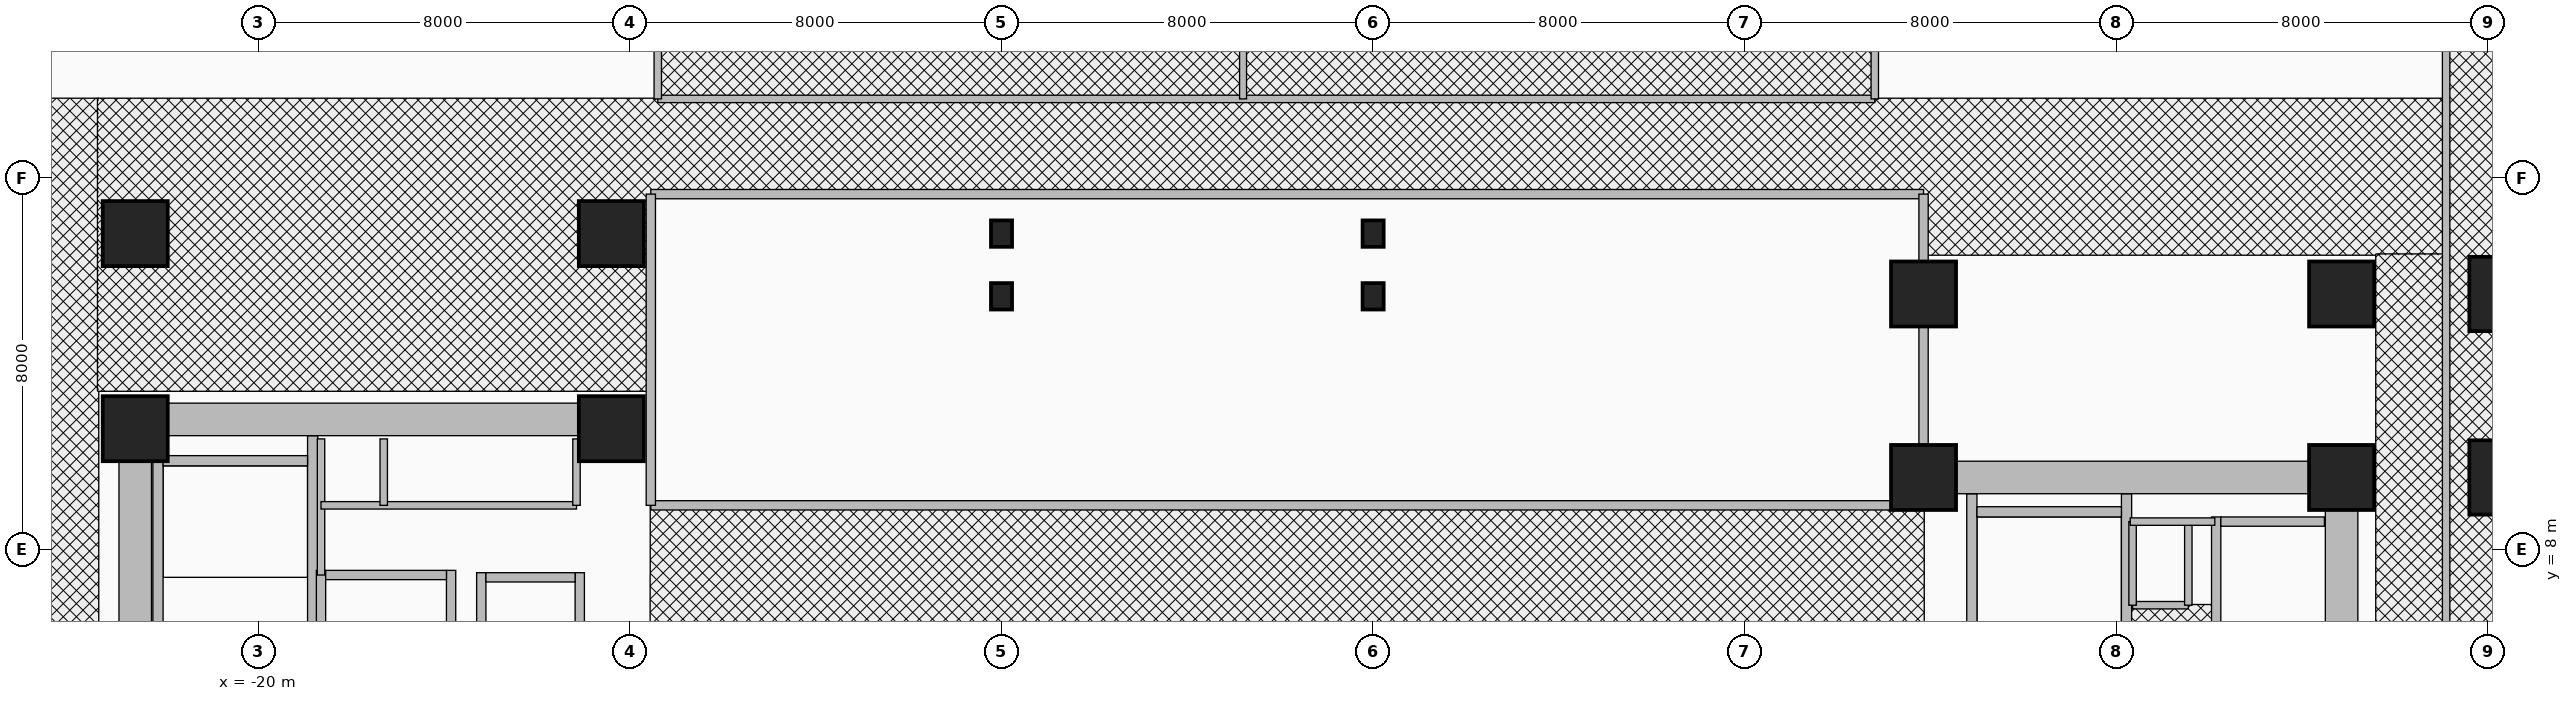
"""IFC4 building model, lengths in metres.
Left out: names, types, materials, properties, quantities, classifications, styles, units other than length and angle.
Written with IfcOpenShell. Run it as: python <this file> out.ifc"""

import sys

from ifc_helpers import new_model, si_unit, direction, frame, frame_2d, origin, origin_2d, place, context, subcontext, project, spatial, rectangle, i_section, extrude, source, transform, mapped, element, fill, save


model = new_model("IFC4")
c1 = context("Model", 3, precision=1e-05, world=origin(), true_north=direction((0.0, 1.0)))
c2 = subcontext(c1, "Body", "Model", "MODEL_VIEW")
j1 = project(units=[si_unit("LENGTHUNIT", "METRE"), si_unit("PLANEANGLEUNIT", "RADIAN")], contexts=[c1])
p1 = place(None, origin())
s1 = spatial("IfcSite", under=j1, at=p1, CompositionType="ELEMENT")
p2 = place(p1, origin())
s2 = spatial("IfcBuilding", under=s1, at=p2, CompositionType="ELEMENT")
p3 = place(p2, frame((0.0, 0.0, 20.8)))
s3 = spatial("IfcBuildingStorey", under=s2, at=p3, CompositionType="ELEMENT", Elevation=20.8)
for number, where, z_axis, x_axis in (
    (1, (-22.16, 1.78, 0.0), (0.0, 0.0, 1.0), (0.0, 1.0, 0.0)),
    (2, (-18.83, 1.78, 0.0), (0.0, 0.0, 1.0), (0.0, 1.0, 0.0)),
):
    element("IfcWall", number, at=place(p3, frame(where, z_axis=z_axis, x_axis=x_axis)), inside=s3, PredefinedType="SHEAR", context=c2, shape_type="SweptSolid", body=[
        extrude(rectangle(XDim=8.67, YDim=0.22, at=frame_2d((4.335, 0.0))), origin(), (0.0, 0.0, 1.0), 4.96),
    ])
p4 = place(p3, frame((-22.05, 9.91, 0.0), z_axis=(0.0, 0.0, 1.0), x_axis=(1.0, 0.0, 0.0)))
e3 = element("IfcWall", 3, at=p4, inside=s3, PredefinedType="SHEAR", context=c2, shape_type="SweptSolid", body=[
    extrude(rectangle(XDim=3.11, YDim=0.22, at=frame_2d((1.555, 0.0))), origin(), (0.0, 0.0, 1.0), 4.96),
])
for number, where, z_axis, x_axis in (
    (4, (16.89, 0.68, 0.0), (0.0, 0.0, 1.0), (0.0, 1.0, 0.0)),
    (5, (20.22, 0.68, 0.0), (0.0, 0.0, 1.0), (0.0, 1.0, 0.0)),
):
    element("IfcWall", number, at=place(p3, frame(where, z_axis=z_axis, x_axis=x_axis)), inside=s3, PredefinedType="SHEAR", context=c2, shape_type="SweptSolid", body=[
        extrude(rectangle(XDim=8.52, YDim=0.22, at=frame_2d((4.26, 0.0))), origin(), (0.0, 0.0, 1.0), 4.96),
    ])
p5 = place(p3, frame((17.0, 8.81, 0.0), z_axis=(0.0, 0.0, 1.0), x_axis=(1.0, 0.0, 0.0)))
e6 = element("IfcWall", 6, at=p5, inside=s3, PredefinedType="SHEAR", context=c2, shape_type="SweptSolid", body=[
    extrude(rectangle(XDim=3.11, YDim=0.22, at=frame_2d((1.555, 0.0))), origin(), (0.0, 0.0, 1.0), 4.96),
])
p6 = place(p3, frame((-22.65, -11.15, 0.0), z_axis=(0.0, 0.0, 1.0), x_axis=(0.0, 1.0, 0.0)))
e7 = element("IfcWall", 7, at=p6, inside=s3, PredefinedType="SHEAR", context=c2, shape_type="SweptSolid", body=[
    extrude(rectangle(XDim=22.3, YDim=0.7, at=frame_2d((11.15, 0.0))), origin(), (0.0, 0.0, 1.0), 4.96),
])
p7 = place(p3, frame((-22.65, 10.8, 0.0), z_axis=(0.0, 0.0, 1.0), x_axis=(1.0, 0.0, 0.0)))
e8 = element("IfcWall", 8, at=p7, inside=s3, PredefinedType="SHEAR", context=c2, shape_type="SweptSolid", body=[
    extrude(rectangle(XDim=10.25, YDim=0.7, at=frame_2d((5.125, 0.0))), origin(), (0.0, 0.0, 1.0), 4.96),
])
p8 = place(p3, frame((24.85, 0.95, 0.0), z_axis=(0.0, 0.0, 1.0), x_axis=(0.0, 1.0, 0.0)))
e9 = element("IfcWall", 9, at=p8, inside=s3, PredefinedType="SHEAR", context=c2, shape_type="SweptSolid", body=[
    extrude(rectangle(XDim=8.95, YDim=0.7, at=frame_2d((4.475, 0.0))), origin(), (0.0, 0.0, 1.0), 4.96),
])
p9 = place(p3, frame((15.85, 9.55, 0.0), z_axis=(0.0, 0.0, 1.0), x_axis=(1.0, 0.0, 0.0)))
e10 = element("IfcWall", 10, at=p9, inside=s3, PredefinedType="SHEAR", context=c2, shape_type="SweptSolid", body=[
    extrude(rectangle(XDim=9.0, YDim=0.7, at=frame_2d((4.5, 0.0))), origin(), (0.0, 0.0, 1.0), 4.96),
])
m1 = source(origin(), c2, "Body", "SweptSolid", [
    extrude(rectangle(XDim=1.4, YDim=1.4, at=origin_2d()), origin(), (0.0, 0.0, 1.0), 5.2),
])
for number, where, z_axis, x_axis in (
    (11, (-22.65, 10.6, 0.0), (0.0, 0.0, 1.0), (1.0, 0.0, 0.0)),
    (12, (-12.4, 10.6, 0.0), (0.0, 0.0, 1.0), (1.0, 0.0, 0.0)),
    (13, (-22.65, 14.8, 0.0), (0.0, 0.0, 1.0), (1.0, 0.0, 0.0)),
    (14, (-12.4, 14.8, 0.0), (0.0, 0.0, 1.0), (1.0, 0.0, 0.0)),
    (15, (15.85, 9.55, 0.0), (0.0, 0.0, 1.0), (1.0, 0.0, 0.0)),
    (16, (24.85, 9.55, 0.0), (0.0, 0.0, 1.0), (1.0, 0.0, 0.0)),
):
    element("IfcColumn", number, at=place(p3, frame(where, z_axis=z_axis, x_axis=x_axis)), inside=s3, PredefinedType="COLUMN", context=c2, shape_type="MappedRepresentation", body=[
        mapped(m1, transform((0.0, 0.0, 0.0), x_axis=(1.0, 0.0, 0.0), y_axis=(0.0, 1.0, 0.0), z_axis=(0.0, 0.0, 1.0), scale=1.0)),
    ])
m2 = source(origin(), c2, "Body", "SweptSolid", [
    extrude(rectangle(XDim=1.6, YDim=1.6, at=origin_2d()), origin(), (0.0, 0.0, 1.0), 5.2),
])
p10 = place(p3, frame((28.4, 9.55, 0.0), z_axis=(0.0, 0.0, 1.0), x_axis=(1.0, 0.0, 0.0)))
e17 = element("IfcColumn", 17, at=p10, inside=s3, PredefinedType="COLUMN", context=c2, shape_type="MappedRepresentation", body=[
    mapped(m2, transform((0.0, 0.0, 0.0), x_axis=(1.0, 0.0, 0.0), y_axis=(0.0, 1.0, 0.0), z_axis=(0.0, 0.0, 1.0), scale=1.0)),
])
for number, where, z_axis, x_axis in (
    (18, (15.85, 13.5, 0.0), (0.0, 0.0, 1.0), (1.0, 0.0, 0.0)),
    (19, (24.85, 13.5, 0.0), (0.0, 0.0, 1.0), (1.0, 0.0, 0.0)),
):
    element("IfcColumn", number, at=place(p3, frame(where, z_axis=z_axis, x_axis=x_axis)), inside=s3, PredefinedType="COLUMN", context=c2, shape_type="MappedRepresentation", body=[
        mapped(m1, transform((0.0, 0.0, 0.0), x_axis=(1.0, 0.0, 0.0), y_axis=(0.0, 1.0, 0.0), z_axis=(0.0, 0.0, 1.0), scale=1.0)),
    ])
p11 = place(p3, frame((28.4, 13.5, 0.0), z_axis=(0.0, 0.0, 1.0), x_axis=(1.0, 0.0, 0.0)))
e20 = element("IfcColumn", 20, at=p11, inside=s3, PredefinedType="COLUMN", context=c2, shape_type="MappedRepresentation", body=[
    mapped(m2, transform((0.0, 0.0, 0.0), x_axis=(1.0, 0.0, 0.0), y_axis=(0.0, 1.0, 0.0), z_axis=(0.0, 0.0, 1.0), scale=1.0)),
])
m3 = source(origin(), c2, "Body", "SweptSolid", [
    extrude(i_section(OverallWidth=0.454, OverallDepth=0.569, WebThickness=0.078, FlangeThickness=0.125, at=origin_2d()), origin(), (0.0, 0.0, 1.0), 5.2),
])
for number, where, z_axis, x_axis in (
    (21, (-4.0, 13.45, 0.0), (0.0, 0.0, 1.0), (1.0, 0.0, 0.0)),
    (22, (-4.0, 14.8, 0.0), (0.0, 0.0, 1.0), (1.0, 0.0, 0.0)),
    (23, (4.0, 13.45, 0.0), (0.0, 0.0, 1.0), (1.0, 0.0, 0.0)),
    (24, (4.0, 14.8, 0.0), (0.0, 0.0, 1.0), (1.0, 0.0, 0.0)),
):
    element("IfcColumn", number, at=place(p3, frame(where, z_axis=z_axis, x_axis=x_axis)), inside=s3, PredefinedType="COLUMN", context=c2, shape_type="MappedRepresentation", body=[
        mapped(m3, transform((0.0, 0.0, 0.0), x_axis=(1.0, 0.0, 0.0), y_axis=(0.0, 1.0, 0.0), z_axis=(0.0, 0.0, 1.0), scale=1.0)),
    ])
for number, where, z_axis, x_axis in (
    (25, (-18.65, 4.225, 0.0), (0.0, 0.0, 1.0), (0.0, 1.0, 0.0)),
    (26, (-15.85, 4.225, 0.0), (0.0, 0.0, 1.0), (0.0, 1.0, 0.0)),
):
    element("IfcWall", number, at=place(p3, frame(where, z_axis=z_axis, x_axis=x_axis)), inside=s3, PredefinedType="MOVABLE", context=c2, shape_type="SweptSolid", body=[
        extrude(rectangle(XDim=3.325, YDim=0.2, at=frame_2d((1.663, 0.0))), origin(), (0.0, 0.0, 1.0), 4.96),
    ])
p12 = place(p3, frame((-18.55, 7.45, 0.0), z_axis=(0.0, 0.0, 1.0), x_axis=(1.0, 0.0, 0.0)))
e27 = element("IfcWall", 27, at=p12, inside=s3, PredefinedType="MOVABLE", context=c2, shape_type="SweptSolid", body=[
    extrude(rectangle(XDim=2.6, YDim=0.2, at=frame_2d((1.3, 0.0))), origin(), (0.0, 0.0, 1.0), 4.96),
])
p13 = place(p12, frame((0.7, 0.0, 0.0)))
e28 = element("IfcOpeningElement", 28, at=p13, cuts=e27, PredefinedType="OPENING", context=c2, shape_type="SweptSolid", body=[
    extrude(rectangle(XDim=1.2, YDim=2.1, at=frame_2d((0.6, 1.05))), frame((0.0, 0.115, 0.0), z_axis=(0.0, -1.0, 0.0), x_axis=(1.0, 0.0, 0.0)), (0.0, 0.0, 1.0), 0.23),
])
p14 = place(p3, frame((22.15, 6.225, 0.0), z_axis=(0.0, 0.0, 1.0), x_axis=(0.0, 1.0, 0.0)))
e29 = element("IfcWall", 29, at=p14, inside=s3, PredefinedType="MOVABLE", context=c2, shape_type="SweptSolid", body=[
    extrude(rectangle(XDim=2.475, YDim=0.2, at=frame_2d((1.237, 0.0))), origin(), (0.0, 0.0, 1.0), 4.96),
])
p15 = place(p3, frame((22.25, 8.6, 0.0), z_axis=(0.0, 0.0, 1.0), x_axis=(1.0, 0.0, 0.0)))
e30 = element("IfcWall", 30, at=p15, inside=s3, PredefinedType="MOVABLE", context=c2, shape_type="SweptSolid", body=[
    extrude(rectangle(XDim=2.23, YDim=0.2, at=frame_2d((1.115, 0.0))), origin(), (0.0, 0.0, 1.0), 3.745),
])
for number, where, z_axis, x_axis in (
    (31, (-15.2, 5.25, 0.0), (0.0, 0.0, 1.0), (0.0, 1.0, 0.0)),
    (32, (-13.08, 5.25, 0.0), (0.0, 0.0, 1.0), (0.0, 1.0, 0.0)),
):
    element("IfcWall", number, at=place(p3, frame(where, z_axis=z_axis, x_axis=x_axis)), inside=s3, PredefinedType="MOVABLE", context=c2, shape_type="SweptSolid", body=[
        extrude(rectangle(XDim=2.25, YDim=0.2, at=frame_2d((1.125, 0.0))), origin(), (0.0, 0.0, 1.0), 4.96),
    ])
p16 = place(p3, frame((-15.1, 7.4, 0.0), z_axis=(0.0, 0.0, 1.0), x_axis=(1.0, 0.0, 0.0)))
e33 = element("IfcWall", 33, at=p16, inside=s3, PredefinedType="MOVABLE", context=c2, shape_type="SweptSolid", body=[
    extrude(rectangle(XDim=1.92, YDim=0.2, at=frame_2d((0.96, 0.0))), origin(), (0.0, 0.0, 1.0), 4.96),
])
p17 = place(p3, frame((-18.65, 7.45, 0.0), z_axis=(0.0, 0.0, 1.0), x_axis=(0.0, 1.0, 0.0)))
e34 = element("IfcWall", 34, at=p17, inside=s3, PredefinedType="PARTITIONING", context=c2, shape_type="SweptSolid", body=[
    extrude(rectangle(XDim=2.93, YDim=0.16, at=frame_2d((1.465, 0.0))), origin(), (0.0, 0.0, 1.0), 3.745),
])
p18 = place(p3, frame((-18.65, 8.95, 0.0), z_axis=(0.0, 0.0, 1.0), x_axis=(1.0, 0.0, 0.0)))
e35 = element("IfcWall", 35, at=p18, inside=s3, PredefinedType="PARTITIONING", context=c2, shape_type="SweptSolid", body=[
    extrude(rectangle(XDim=5.5, YDim=0.16, at=frame_2d((2.75, 0.0))), origin(), (0.0, 0.0, 1.0), 4.96),
])
p19 = place(p18, frame((0.3, 0.0, 0.0)))
e36 = element("IfcOpeningElement", 36, at=p19, cuts=e35, PredefinedType="OPENING", context=c2, shape_type="SweptSolid", body=[
    extrude(rectangle(XDim=0.85, YDim=2.05, at=frame_2d((0.425, 1.025))), frame((0.0, 0.095, 0.0), z_axis=(0.0, -1.0, 0.0), x_axis=(1.0, 0.0, 0.0)), (0.0, 0.0, 1.0), 0.19),
])
p20 = place(p18, frame((2.5, 0.0, 0.0)))
e37 = element("IfcOpeningElement", 37, at=p20, cuts=e35, PredefinedType="OPENING", context=c2, shape_type="SweptSolid", body=[
    extrude(rectangle(XDim=0.95, YDim=2.15, at=frame_2d((0.475, 1.075))), frame((0.0, 0.095, 0.0), z_axis=(0.0, -1.0, 0.0), x_axis=(1.0, 0.0, 0.0)), (0.0, 0.0, 1.0), 0.19),
])
for number, where, z_axis, x_axis in (
    (38, (-13.15, 8.95, 0.0), (0.0, 0.0, 1.0), (0.0, 1.0, 0.0)),
    (39, (-17.3, 8.95, 0.0), (0.0, 0.0, 1.0), (0.0, 1.0, 0.0)),
):
    element("IfcWall", number, at=place(p3, frame(where, z_axis=z_axis, x_axis=x_axis)), inside=s3, PredefinedType="PARTITIONING", context=c2, shape_type="SweptSolid", body=[
        extrude(rectangle(XDim=1.43, YDim=0.16, at=frame_2d((0.715, 0.0))), origin(), (0.0, 0.0, 1.0), 3.745),
    ])
p21 = place(p3, frame((20.35, 6.8, 0.0), z_axis=(0.0, 0.0, 1.0), x_axis=(1.0, 0.0, 0.0)))
e40 = element("IfcWall", 40, at=p21, inside=s3, PredefinedType="PARTITIONING", context=c2, shape_type="SweptSolid", body=[
    extrude(rectangle(XDim=1.2, YDim=0.16, at=frame_2d((0.6, 0.0))), origin(), (0.0, 0.0, 1.0), 4.96),
])
p22 = place(p21, frame((0.175, 0.0, 0.0)))
e41 = element("IfcOpeningElement", 41, at=p22, cuts=e40, PredefinedType="OPENING", context=c2, shape_type="SweptSolid", body=[
    extrude(rectangle(XDim=0.85, YDim=2.05, at=frame_2d((0.425, 1.025))), frame((0.0, 0.095, 0.0), z_axis=(0.0, -1.0, 0.0), x_axis=(1.0, 0.0, 0.0)), (0.0, 0.0, 1.0), 0.19),
])
for number, where, z_axis, x_axis in (
    (42, (21.55, 6.8, 0.0), (0.0, 0.0, 1.0), (0.0, 1.0, 0.0)),
    (43, (20.35, 6.8, 0.0), (0.0, 0.0, 1.0), (0.0, 1.0, 0.0)),
):
    element("IfcWall", number, at=place(p3, frame(where, z_axis=z_axis, x_axis=x_axis)), inside=s3, PredefinedType="PARTITIONING", context=c2, shape_type="SweptSolid", body=[
        extrude(rectangle(XDim=1.8, YDim=0.16, at=frame_2d((0.9, 0.0))), origin(), (0.0, 0.0, 1.0), 4.96),
    ])
p23 = place(p3, frame((20.3, 8.6, 0.0), z_axis=(0.0, 0.0, 1.0), x_axis=(1.0, 0.0, 0.0)))
e44 = element("IfcWall", 44, at=p23, inside=s3, PredefinedType="PARTITIONING", context=c2, shape_type="SweptSolid", body=[
    extrude(rectangle(XDim=1.82, YDim=0.16, at=frame_2d((0.91, 0.0))), origin(), (0.0, 0.0, 1.0), 4.96),
])
p24 = place(p3, frame((-11.4, 17.7, 0.0), z_axis=(0.0, 0.0, 1.0), x_axis=(1.0, 0.0, 0.0)))
e45 = element("IfcWall", 45, at=p24, inside=s3, PredefinedType="PARTITIONING", context=c2, shape_type="SweptSolid", body=[
    extrude(rectangle(XDim=26.2, YDim=0.16, at=frame_2d((13.1, 0.0))), origin(), (0.0, 0.0, 1.0), 4.96),
])
p25 = place(p24, frame((4.5, 0.0, 0.0)))
e46 = element("IfcOpeningElement", 46, at=p25, cuts=e45, PredefinedType="OPENING", context=c2, shape_type="SweptSolid", body=[
    extrude(rectangle(XDim=1.8, YDim=2.15, at=frame_2d((0.9, 1.075))), frame((0.0, 0.095, 0.0), z_axis=(0.0, -1.0, 0.0), x_axis=(1.0, 0.0, 0.0)), (0.0, 0.0, 1.0), 0.19),
])
p26 = place(p24, frame((17.5, 0.0, 0.0)))
e47 = element("IfcOpeningElement", 47, at=p26, cuts=e45, PredefinedType="OPENING", context=c2, shape_type="SweptSolid", body=[
    extrude(rectangle(XDim=1.8, YDim=2.15, at=frame_2d((0.9, 1.075))), frame((0.0, 0.095, 0.0), z_axis=(0.0, -1.0, 0.0), x_axis=(1.0, 0.0, 0.0)), (0.0, 0.0, 1.0), 0.19),
])
for number, where, z_axis, x_axis in (
    (48, (-11.4, 17.7, 0.0), (0.0, 0.0, 1.0), (0.0, 1.0, 0.0)),
    (49, (14.8, 17.7, 0.0), (0.0, 0.0, 1.0), (0.0, 1.0, 0.0)),
):
    element("IfcWall", number, at=place(p3, frame(where, z_axis=z_axis, x_axis=x_axis)), inside=s3, PredefinedType="PARTITIONING", context=c2, shape_type="SweptSolid", body=[
        extrude(rectangle(XDim=5.04, YDim=0.16, at=frame_2d((2.52, 0.0))), origin(), (0.0, 0.0, 1.0), 3.997),
    ])
p27 = place(p3, frame((1.2, 17.7, 0.0), z_axis=(0.0, 0.0, 1.0), x_axis=(0.0, 1.0, 0.0)))
e50 = element("IfcWall", 50, at=p27, inside=s3, PredefinedType="PARTITIONING", context=c2, shape_type="SweptSolid", body=[
    extrude(rectangle(XDim=5.04, YDim=0.15, at=frame_2d((2.52, 0.0))), origin(), (0.0, 0.0, 1.0), 3.997),
])
p28 = place(p3, frame((27.1, -22.74, 0.0), z_axis=(0.0, 0.0, 1.0), x_axis=(0.0, 1.0, 0.0)))
e51 = element("IfcWall", 51, at=p28, inside=s3, PredefinedType="PARTITIONING", context=c2, shape_type="SweptSolid", body=[
    extrude(rectangle(XDim=45.48, YDim=0.16, at=frame_2d((22.74, 0.0))), origin(), (0.0, 0.0, 1.0), 3.745),
])
p29 = place(p28, frame((7.0, 0.0, 0.0)))
e52 = element("IfcOpeningElement", 52, at=p29, cuts=e51, PredefinedType="OPENING", context=c2, shape_type="SweptSolid", body=[
    extrude(rectangle(XDim=1.8, YDim=2.15, at=frame_2d((0.9, 1.075))), frame((0.0, 0.095, 0.0), z_axis=(0.0, -1.0, 0.0), x_axis=(1.0, 0.0, 0.0)), (0.0, 0.0, 1.0), 0.19),
])
p30 = place(p28, frame((25.0, 0.0, 0.0)))
e53 = element("IfcOpeningElement", 53, at=p30, cuts=e51, PredefinedType="OPENING", context=c2, shape_type="SweptSolid", body=[
    extrude(rectangle(XDim=1.8, YDim=2.15, at=frame_2d((0.9, 1.075))), frame((0.0, 0.095, 0.0), z_axis=(0.0, -1.0, 0.0), x_axis=(1.0, 0.0, 0.0)), (0.0, 0.0, 1.0), 0.19),
])
p31 = place(p3, frame((-11.55, 8.95, 0.0), z_axis=(0.0, 0.0, 1.0), x_axis=(1.0, 0.0, 0.0)))
e54 = element("IfcWall", 54, at=p31, inside=s3, PredefinedType="PARTITIONING", context=c2, shape_type="SweptSolid", body=[
    extrude(rectangle(XDim=27.4, YDim=0.2, at=frame_2d((13.7, 0.0))), origin(), (0.0, 0.0, 1.0), 3.745),
])
p32 = place(p3, frame((-11.55, 15.65, 0.0), z_axis=(0.0, 0.0, 1.0), x_axis=(1.0, 0.0, 0.0)))
e55 = element("IfcWall", 55, at=p32, inside=s3, PredefinedType="PARTITIONING", context=c2, shape_type="SweptSolid", body=[
    extrude(rectangle(XDim=27.4, YDim=0.2, at=frame_2d((13.7, 0.0))), origin(), (0.0, 0.0, 1.0), 4.96),
])
for number, where, z_axis, x_axis in (
    (56, (-11.55, 8.95, 0.0), (0.0, 0.0, 1.0), (0.0, 1.0, 0.0)),
    (57, (15.85, 8.95, 0.0), (0.0, 0.0, 1.0), (0.0, 1.0, 0.0)),
):
    element("IfcWall", number, at=place(p3, frame(where, z_axis=z_axis, x_axis=x_axis)), inside=s3, PredefinedType="PARTITIONING", context=c2, shape_type="SweptSolid", body=[
        extrude(rectangle(XDim=6.7, YDim=0.2, at=frame_2d((3.35, 0.0))), origin(), (0.0, 0.0, 1.0), 3.745),
    ])
p33 = place(p13, origin())
e58 = element("IfcDoor", 58, at=p33, inside=s3, OperationType="DOUBLE_DOOR_SLIDING", PredefinedType="DOOR", context=c2, shape_type="SweptSolid", body=[
    extrude(rectangle(XDim=1.2, YDim=2.1, at=frame_2d((0.6, 1.05))), frame((0.0, 0.025, 0.0), z_axis=(0.0, -1.0, 0.0), x_axis=(1.0, 0.0, 0.0)), (0.0, 0.0, 1.0), 0.05),
])
fill(e28, e58)
p34 = place(p19, origin())
e59 = element("IfcDoor", 59, at=p34, inside=s3, OperationType="SINGLE_SWING_LEFT", PredefinedType="DOOR", context=c2, shape_type="SweptSolid", body=[
    extrude(rectangle(XDim=0.85, YDim=2.05, at=frame_2d((0.425, 1.025))), frame((0.0, 0.025, 0.0), z_axis=(0.0, -1.0, 0.0), x_axis=(1.0, 0.0, 0.0)), (0.0, 0.0, 1.0), 0.05),
])
fill(e36, e59)
p35 = place(p20, origin())
e60 = element("IfcDoor", 60, at=p35, inside=s3, OperationType="SINGLE_SWING_RIGHT", PredefinedType="DOOR", context=c2, shape_type="SweptSolid", body=[
    extrude(rectangle(XDim=0.95, YDim=2.15, at=frame_2d((0.475, 1.075))), frame((0.0, 0.025, 0.0), z_axis=(0.0, -1.0, 0.0), x_axis=(1.0, 0.0, 0.0)), (0.0, 0.0, 1.0), 0.05),
])
fill(e37, e60)
p36 = place(p22, origin())
e61 = element("IfcDoor", 61, at=p36, inside=s3, OperationType="SINGLE_SWING_RIGHT", PredefinedType="DOOR", context=c2, shape_type="SweptSolid", body=[
    extrude(rectangle(XDim=0.85, YDim=2.05, at=frame_2d((0.425, 1.025))), frame((0.0, 0.025, 0.0), z_axis=(0.0, -1.0, 0.0), x_axis=(1.0, 0.0, 0.0)), (0.0, 0.0, 1.0), 0.05),
])
fill(e41, e61)
p37 = place(p25, frame((1.8, 0.0, 0.0), z_axis=(0.0, 0.0, 1.0), x_axis=(-1.0, 0.0, 0.0)))
e62 = element("IfcDoor", 62, at=p37, inside=s3, OperationType="DOUBLE_DOOR_SINGLE_SWING", PredefinedType="DOOR", context=c2, shape_type="SweptSolid", body=[
    extrude(rectangle(XDim=1.8, YDim=2.15, at=frame_2d((0.9, 1.075))), frame((0.0, 0.025, 0.0), z_axis=(0.0, -1.0, 0.0), x_axis=(1.0, 0.0, 0.0)), (0.0, 0.0, 1.0), 0.05),
])
fill(e46, e62)
p38 = place(p26, origin())
e63 = element("IfcDoor", 63, at=p38, inside=s3, OperationType="DOUBLE_DOOR_SINGLE_SWING", PredefinedType="DOOR", context=c2, shape_type="SweptSolid", body=[
    extrude(rectangle(XDim=1.8, YDim=2.15, at=frame_2d((0.9, 1.075))), frame((0.0, 0.025, 0.0), z_axis=(0.0, -1.0, 0.0), x_axis=(1.0, 0.0, 0.0)), (0.0, 0.0, 1.0), 0.05),
])
fill(e47, e63)
save(model, sys.argv[1])
